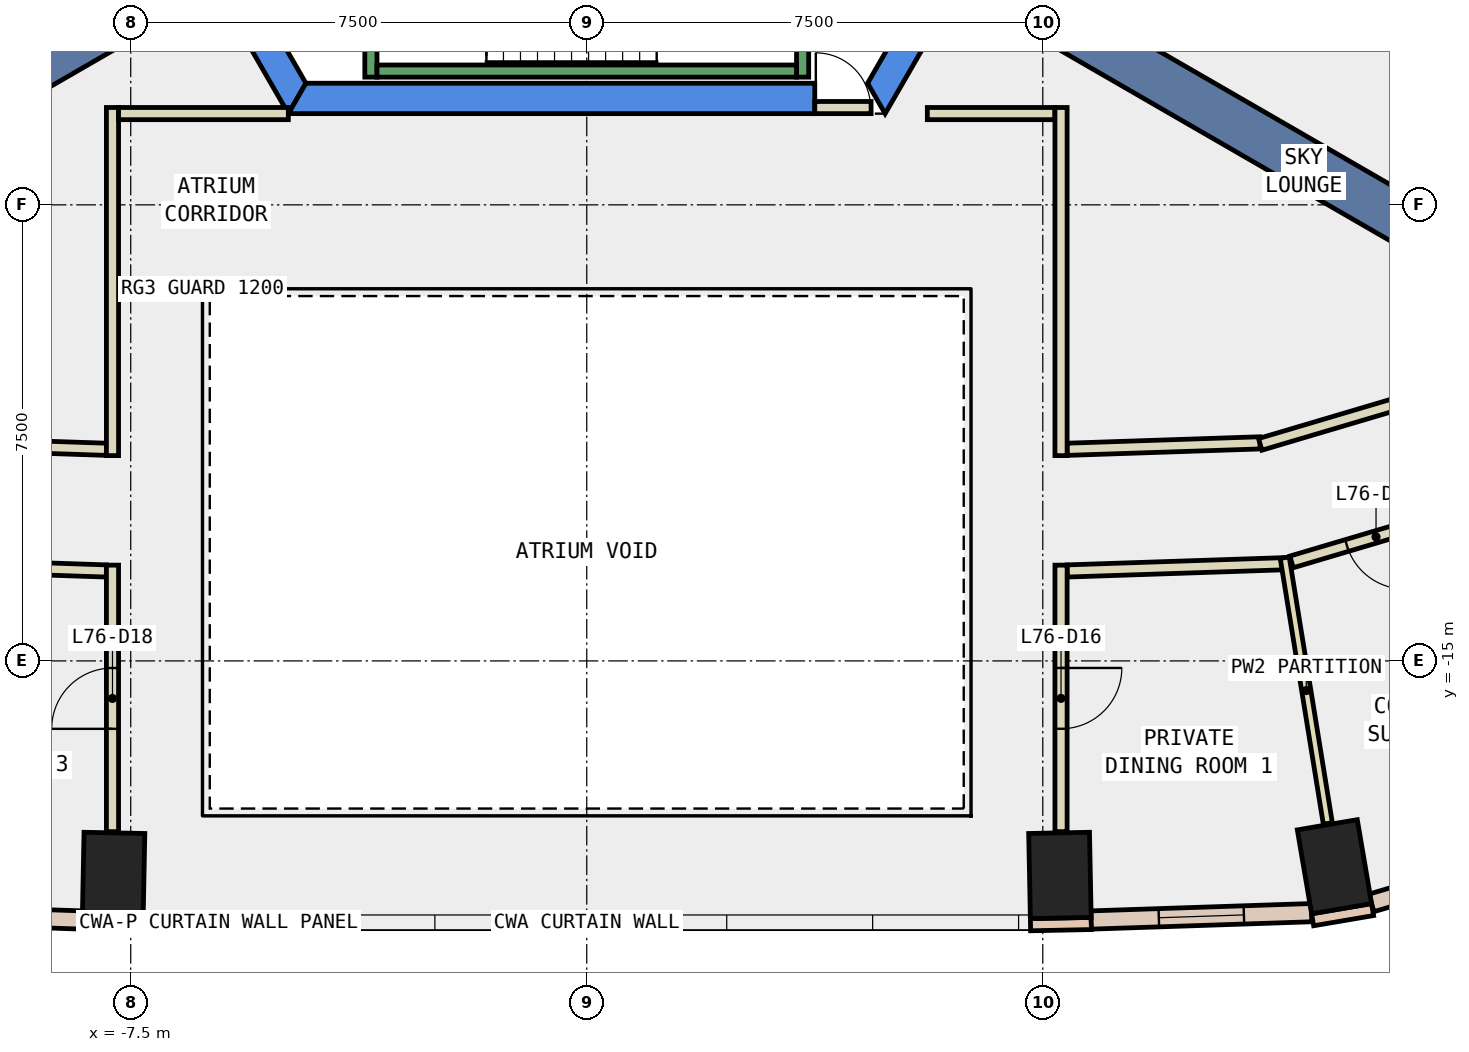
"""IFC4 building model, lengths in metres.
Left out: names, types, materials, properties, quantities, classifications, styles, units other than length and angle.
Written with IfcOpenShell. Run it as: python <this file> out.ifc"""

import sys

from ifc_helpers import new_model, si_unit, direction, frame, frame_2d, origin, origin_2d, place, context, subcontext, project, spatial, polyline, rectangle, outline, extrude, element, fill, save


model = new_model("IFC4")
c1 = context("Model", 3, precision=1e-05, world=origin(), true_north=direction((0.0, 1.0)))
c2 = subcontext(c1, "Body", "Model", "MODEL_VIEW")
j1 = project(units=[si_unit("LENGTHUNIT", "METRE"), si_unit("PLANEANGLEUNIT", "RADIAN")], contexts=[c1])
p1 = place(None, origin())
s1 = spatial("IfcSite", under=j1, at=p1, CompositionType="ELEMENT")
p2 = place(p1, origin())
s2 = spatial("IfcBuilding", under=s1, at=p2, CompositionType="ELEMENT")
p3 = place(p2, frame((0.0, 0.0, 322.4)))
s3 = spatial("IfcBuildingStorey", under=s2, at=p3, CompositionType="ELEMENT", Elevation=322.4)
for number, where, z_axis, x_axis in (
    (1, (-7.782, -18.528, -0.34), (0.0, 0.0, 1.0), (-1.0, 0.02, 0.0)),
    (2, (7.782, -18.528, -0.34), (0.0, 0.0, 1.0), (1.0, 0.02, 0.0)),
    (3, (12.297, -18.385, -0.34), (0.0, 0.0, 1.0), (0.986, 0.168, 0.0)),
):
    element("IfcColumn", number, at=place(p3, frame(where, z_axis=z_axis, x_axis=x_axis)), inside=s3, PredefinedType="COLUMN", context=c2, shape_type="SweptSolid", body=[
        extrude(rectangle(XDim=1.0, YDim=1.4, at=origin_2d()), origin(), (0.0, 0.0, 1.0), 3.34),
    ])
p4 = place(p3, frame((0.0, 0.0, -0.34)))
e4 = element("IfcWall", 4, at=p4, inside=s3, PredefinedType="SHEAR", context=c2, shape_type="SweptSolid", body=[
    extrude(outline(polyline([(-9.815, 2.5), (-4.907, -6.0), (-4.619, -5.5), (-9.238, 2.5), (-9.815, 2.5)])), origin(), (0.0, 0.0, 1.0), 3.34),
])
p5 = place(p3, frame((0.0, 0.0, -0.34)))
e5 = element("IfcWall", 5, at=p5, inside=s3, PredefinedType="SHEAR", context=c2, shape_type="SweptSolid", body=[
    extrude(outline(polyline([(3.75, -6.0), (3.75, -5.5), (-4.619, -5.5), (-4.907, -6.0), (3.75, -6.0)])), origin(), (0.0, 0.0, 1.0), 3.34),
])
p6 = place(p3, frame((0.0, 0.0, -0.34)))
e6 = element("IfcWall", 6, at=p6, inside=s3, PredefinedType="SHEAR", context=c2, shape_type="SweptSolid", body=[
    extrude(outline(polyline([(4.907, -6.0), (9.815, 2.5), (9.238, 2.5), (4.619, -5.5), (4.907, -6.0)])), origin(), (0.0, 0.0, 1.0), 3.34),
])
for number, where, z_axis, x_axis in (
    (7, (6.279, -3.625, -0.34), (0.0, 0.0, 1.0), (0.866, -0.5, 0.0)),
    (8, (-6.279, -3.625, -0.34), (0.0, 0.0, 1.0), (-0.866, -0.5, 0.0)),
):
    element("IfcWall", number, at=place(p3, frame(where, z_axis=z_axis, x_axis=x_axis)), inside=s3, PredefinedType="SHEAR", context=c2, shape_type="SweptSolid", body=[
        extrude(rectangle(XDim=9.0, YDim=0.8, at=frame_2d((4.5, 0.0))), origin(), (0.0, 0.0, 1.0), 3.34),
    ])
for number, where, z_axis, x_axis in (
    (9, (-8.298, -19.318, 0.0), (0.0, 0.0, 1.0), (1.0, -0.02, 0.0)),
    (10, (7.298, -19.338, 0.0), (0.0, 0.0, 1.0), (1.0, 0.02, 0.0)),
    (11, (11.938, -19.257, 0.0), (0.0, 0.0, 1.0), (0.986, 0.168, 0.0)),
):
    element("IfcWall", number, at=place(p3, frame(where, z_axis=z_axis, x_axis=x_axis)), inside=s3, PredefinedType="STANDARD", context=c2, shape_type="SweptSolid", body=[
        extrude(rectangle(XDim=1.0, YDim=0.2, at=frame_2d((0.5, 0.0))), origin(), (0.0, 0.0, 1.0), 3.0),
    ])
p7 = place(p3, frame((-11.919, -19.14, 0.0), z_axis=(0.0, 0.0, 1.0), x_axis=(0.999441913039, -0.033404527552, 0.0)))
e12 = element("IfcWall", 12, at=p7, inside=s3, PredefinedType="STANDARD", context=c2, shape_type="SweptSolid", body=[
    extrude(rectangle(XDim=3.625, YDim=0.3, at=frame_2d((1.812, 0.0))), origin(), (0.0, 0.0, 1.0), 3.0),
])
p8 = place(p7, frame((1.113, 0.0, 0.9)))
e13 = element("IfcOpeningElement", 13, at=p8, cuts=e12, PredefinedType="OPENING", context=c2, shape_type="SweptSolid", body=[
    extrude(rectangle(XDim=1.4, YDim=2.0, at=frame_2d((0.7, 1.0))), frame((0.0, 0.16, 0.0), z_axis=(0.0, -1.0, 0.0), x_axis=(1.0, 0.0, 0.0)), (0.0, 0.0, 1.0), 0.32),
])
p9 = place(p3, frame((8.296, -19.261, 0.0), z_axis=(0.0, 0.0, 1.0), x_axis=(0.999441913039, 0.033404527552, 0.0)))
e14 = element("IfcWall", 14, at=p9, inside=s3, PredefinedType="STANDARD", context=c2, shape_type="SweptSolid", body=[
    extrude(rectangle(XDim=3.625, YDim=0.3, at=frame_2d((1.812, 0.0))), origin(), (0.0, 0.0, 1.0), 3.0),
])
p10 = place(p9, frame((1.113, 0.0, 0.9)))
e15 = element("IfcOpeningElement", 15, at=p10, cuts=e14, PredefinedType="OPENING", context=c2, shape_type="SweptSolid", body=[
    extrude(rectangle(XDim=1.4, YDim=2.0, at=frame_2d((0.7, 1.0))), frame((0.0, 0.16, 0.0), z_axis=(0.0, -1.0, 0.0), x_axis=(1.0, 0.0, 0.0)), (0.0, 0.0, 1.0), 0.32),
])
p11 = place(p3, frame((12.904, -18.98, 0.0), z_axis=(0.0, 0.0, 1.0), x_axis=(0.958757933751, 0.284223898486, 0.0)))
e16 = element("IfcWall", 16, at=p11, inside=s3, PredefinedType="STANDARD", context=c2, shape_type="SweptSolid", body=[
    extrude(rectangle(XDim=5.15, YDim=0.3, at=frame_2d((2.575, 0.0))), origin(), (0.0, 0.0, 1.0), 3.0),
])
p12 = place(p11, frame((0.588, 0.0, 0.9)))
e17 = element("IfcOpeningElement", 17, at=p12, cuts=e16, PredefinedType="OPENING", context=c2, shape_type="SweptSolid", body=[
    extrude(rectangle(XDim=1.4, YDim=2.0, at=frame_2d((0.7, 1.0))), frame((0.0, 0.16, 0.0), z_axis=(0.0, -1.0, 0.0), x_axis=(1.0, 0.0, 0.0)), (0.0, 0.0, 1.0), 0.32),
])
p13 = place(p11, frame((3.163, 0.0, 0.9)))
e18 = element("IfcOpeningElement", 18, at=p13, cuts=e16, PredefinedType="OPENING", context=c2, shape_type="SweptSolid", body=[
    extrude(rectangle(XDim=1.4, YDim=2.0, at=frame_2d((0.7, 1.0))), frame((0.0, 0.16, 0.0), z_axis=(0.0, -1.0, 0.0), x_axis=(1.0, 0.0, 0.0)), (0.0, 0.0, 1.0), 0.32),
])
p14 = place(p3, frame((7.9, -11.52, 0.0), z_axis=(0.0, 0.0, 1.0), x_axis=(0.999442599499, 0.033383982774, 0.0)))
e19 = element("IfcWall", 19, at=p14, inside=s3, PredefinedType="PARTITIONING", context=c2, shape_type="SweptSolid", body=[
    extrude(rectangle(XDim=3.174, YDim=0.2, at=frame_2d((1.587, 0.0))), origin(), (0.0, 0.0, 1.0), 3.0),
])
p15 = place(p3, frame((11.076, -11.439, 0.0), z_axis=(0.0, 0.0, 1.0), x_axis=(0.958760241353, 0.284216114252, 0.0)))
e20 = element("IfcWall", 20, at=p15, inside=s3, PredefinedType="PARTITIONING", context=c2, shape_type="SweptSolid", body=[
    extrude(rectangle(XDim=3.578, YDim=0.2, at=frame_2d((1.789, 0.0))), origin(), (0.0, 0.0, 1.0), 3.0),
])
p16 = place(p3, frame((15.233, -4.982, 0.0), z_axis=(0.0, 0.0, 1.0), x_axis=(-0.475643534049, 0.879638123615, 0.0)))
e21 = element("IfcWall", 21, at=p16, inside=s3, PredefinedType="PARTITIONING", context=c2, shape_type="SweptSolid", body=[
    extrude(rectangle(XDim=7.871, YDim=0.2, at=frame_2d((3.936, 0.0))), origin(), (0.0, 0.0, 1.0), 3.0),
])
p17 = place(p16, frame((3.036, 0.0, 0.0)))
e22 = element("IfcOpeningElement", 22, at=p17, cuts=e21, PredefinedType="OPENING", context=c2, shape_type="SweptSolid", body=[
    extrude(rectangle(XDim=1.8, YDim=2.1, at=frame_2d((0.9, 1.05))), frame((0.0, 0.11, 0.0), z_axis=(0.0, -1.0, 0.0), x_axis=(1.0, 0.0, 0.0)), (0.0, 0.0, 1.0), 0.22),
])
p18 = place(p3, frame((-11.072, -11.414, 0.0), z_axis=(0.0, 0.0, 1.0), x_axis=(0.999442599499, -0.033383982774, 0.0)))
e23 = element("IfcWall", 23, at=p18, inside=s3, PredefinedType="PARTITIONING", context=c2, shape_type="SweptSolid", body=[
    extrude(rectangle(XDim=3.174, YDim=0.2, at=frame_2d((1.587, 0.0))), origin(), (0.0, 0.0, 1.0), 3.0),
])
p19 = place(p3, frame((11.52, -13.4, 0.0), z_axis=(0.0, 0.0, 1.0), x_axis=(-0.999441010134, -0.033431530957, 0.0)))
e24 = element("IfcWall", 24, at=p19, inside=s3, PredefinedType="PARTITIONING", context=c2, shape_type="SweptSolid", body=[
    extrude(rectangle(XDim=3.622, YDim=0.2, at=frame_2d((1.811, 0.0))), origin(), (0.0, 0.0, 1.0), 3.0),
])
p20 = place(p3, frame((14.371, -12.548, 0.0), z_axis=(0.0, 0.0, 1.0), x_axis=(-0.958773475867, -0.284171465799, 0.0)))
e25 = element("IfcWall", 25, at=p20, inside=s3, PredefinedType="PARTITIONING", context=c2, shape_type="SweptSolid", body=[
    extrude(rectangle(XDim=2.9, YDim=0.2, at=frame_2d((1.45, 0.0))), origin(), (0.0, 0.0, 1.0), 3.0),
])
p21 = place(p20, frame((0.95, 0.0, 0.0)))
e26 = element("IfcOpeningElement", 26, at=p21, cuts=e25, PredefinedType="OPENING", context=c2, shape_type="SweptSolid", body=[
    extrude(rectangle(XDim=1.0, YDim=2.1, at=frame_2d((0.5, 1.05))), frame((0.0, 0.11, 0.0), z_axis=(0.0, -1.0, 0.0), x_axis=(1.0, 0.0, 0.0)), (0.0, 0.0, 1.0), 0.22),
])
p22 = place(p3, frame((-7.9, -13.521, 0.0), z_axis=(0.0, 0.0, 1.0), x_axis=(-0.999437184802, 0.033545694739, 0.0)))
e27 = element("IfcWall", 27, at=p22, inside=s3, PredefinedType="PARTITIONING", context=c2, shape_type="SweptSolid", body=[
    extrude(rectangle(XDim=3.697, YDim=0.2, at=frame_2d((1.849, 0.0))), origin(), (0.0, 0.0, 1.0), 3.0),
])
p23 = place(p3, frame((5.601, -5.999, 0.0), z_axis=(0.0, 0.0, 1.0), x_axis=(1.0, 0.0, 0.0)))
e28 = element("IfcWall", 28, at=p23, inside=s3, PredefinedType="PARTITIONING", context=c2, shape_type="SweptSolid", body=[
    extrude(rectangle(XDim=2.099, YDim=0.2, at=frame_2d((1.049, 0.0))), origin(), (0.0, 0.0, 1.0), 3.0),
])
for number, where, z_axis, x_axis in (
    (29, (7.8, -5.899, 0.0), (0.0, 0.0, 1.0), (0.0, -1.0, 0.0)),
    (30, (-7.8, -11.624, 0.0), (0.0, 0.0, 1.0), (0.0, 1.0, 0.0)),
):
    element("IfcWall", number, at=place(p3, frame(where, z_axis=z_axis, x_axis=x_axis)), inside=s3, PredefinedType="PARTITIONING", context=c2, shape_type="SweptSolid", body=[
        extrude(rectangle(XDim=5.725, YDim=0.2, at=frame_2d((2.863, 0.0))), origin(), (0.0, 0.0, 1.0), 3.0),
    ])
p24 = place(p3, frame((-7.7, -5.999, 0.0), z_axis=(0.0, 0.0, 1.0), x_axis=(1.0, 0.0, 0.0)))
e31 = element("IfcWall", 31, at=p24, inside=s3, PredefinedType="PARTITIONING", context=c2, shape_type="SweptSolid", body=[
    extrude(rectangle(XDim=2.792, YDim=0.2, at=frame_2d((1.396, 0.0))), origin(), (0.0, 0.0, 1.0), 3.0),
])
p25 = place(p3, frame((7.8, -13.425, 0.0), z_axis=(0.0, 0.0, 1.0), x_axis=(0.0, -1.0, 0.0)))
e32 = element("IfcWall", 32, at=p25, inside=s3, PredefinedType="PARTITIONING", context=c2, shape_type="SweptSolid", body=[
    extrude(rectangle(XDim=4.383, YDim=0.2, at=frame_2d((2.191, 0.0))), origin(), (0.0, 0.0, 1.0), 3.0),
])
p26 = place(p25, frame((1.691, 0.0, 0.0)))
e33 = element("IfcOpeningElement", 33, at=p26, cuts=e32, PredefinedType="OPENING", context=c2, shape_type="SweptSolid", body=[
    extrude(rectangle(XDim=1.0, YDim=2.1, at=frame_2d((0.5, 1.05))), frame((0.0, 0.11, 0.0), z_axis=(0.0, -1.0, 0.0), x_axis=(1.0, 0.0, 0.0)), (0.0, 0.0, 1.0), 0.22),
])
p27 = place(p3, frame((-7.8, -17.808, 0.0), z_axis=(0.0, 0.0, 1.0), x_axis=(0.0, 1.0, 0.0)))
e34 = element("IfcWall", 34, at=p27, inside=s3, PredefinedType="PARTITIONING", context=c2, shape_type="SweptSolid", body=[
    extrude(rectangle(XDim=4.383, YDim=0.2, at=frame_2d((2.191, 0.0))), origin(), (0.0, 0.0, 1.0), 3.0),
])
p28 = place(p27, frame((1.691, 0.0, 0.0)))
e35 = element("IfcOpeningElement", 35, at=p28, cuts=e34, PredefinedType="OPENING", context=c2, shape_type="SweptSolid", body=[
    extrude(rectangle(XDim=1.0, YDim=2.1, at=frame_2d((0.5, 1.05))), frame((0.0, 0.11, 0.0), z_axis=(0.0, -1.0, 0.0), x_axis=(1.0, 0.0, 0.0)), (0.0, 0.0, 1.0), 0.22),
])
p29 = place(p3, frame((-6.705, -2.887, 0.0), z_axis=(0.0, 0.0, 1.0), x_axis=(-0.866001397039, -0.500041578597, 0.0)))
e36 = element("IfcWall", 36, at=p29, inside=s3, PredefinedType="PARTITIONING", context=c2, shape_type="SweptSolid", body=[
    extrude(rectangle(XDim=6.998, YDim=0.1, at=frame_2d((3.499, 0.0))), origin(), (0.0, 0.0, 1.0), 3.0),
])
p30 = place(p3, frame((11.479, -13.302, 0.0), z_axis=(0.0, 0.0, 1.0), x_axis=(0.16010600403, -0.987099826499, 0.0)))
e37 = element("IfcWall", 37, at=p30, inside=s3, PredefinedType="PARTITIONING", context=c2, shape_type="SweptSolid", body=[
    extrude(rectangle(XDim=4.428, YDim=0.15, at=frame_2d((2.214, 0.0))), origin(), (0.0, 0.0, 1.0), 3.0),
])
p31 = place(p3, frame((3.75, -5.9, 0.0), z_axis=(0.0, 0.0, 1.0), x_axis=(1.0, 0.0, 0.0)))
e38 = element("IfcWall", 38, at=p31, inside=s3, PredefinedType="PARTITIONING", context=c2, shape_type="SweptSolid", body=[
    extrude(rectangle(XDim=0.926, YDim=0.2, at=frame_2d((0.463, 0.0))), origin(), (0.0, 0.0, 1.0), 2.4),
])
p32 = place(p31, frame((0.017, 0.0, 0.0)))
e39 = element("IfcOpeningElement", 39, at=p32, cuts=e38, PredefinedType="OPENING", context=c2, shape_type="SweptSolid", body=[
    extrude(rectangle(XDim=0.9, YDim=2.1, at=frame_2d((0.45, 1.05))), frame((0.0, 0.11, 0.0), z_axis=(0.0, -1.0, 0.0), x_axis=(1.0, 0.0, 0.0)), (0.0, 0.0, 1.0), 0.22),
])
p33 = place(p3, frame((-3.55, -1.0, 0.0), z_axis=(0.0, 0.0, 1.0), x_axis=(0.0, -1.0, 0.0)))
e40 = element("IfcWall", 40, at=p33, inside=s3, PredefinedType="STANDARD", context=c2, shape_type="SweptSolid", body=[
    extrude(rectangle(XDim=4.4, YDim=0.2, at=frame_2d((2.2, 0.0))), origin(), (0.0, 0.0, 1.0), 3.0),
])
p34 = place(p33, frame((2.4, 0.0, 0.0)))
e41 = element("IfcOpeningElement", 41, at=p34, cuts=e40, PredefinedType="OPENING", context=c2, shape_type="SweptSolid", body=[
    extrude(rectangle(XDim=1.1, YDim=2.2, at=frame_2d((0.55, 1.1))), frame((0.0, 0.11, 0.0), z_axis=(0.0, -1.0, 0.0), x_axis=(1.0, 0.0, 0.0)), (0.0, 0.0, 1.0), 0.22),
])
p35 = place(p3, frame((3.55, -2.667, 0.0), z_axis=(0.0, 0.0, 1.0), x_axis=(0.0, -1.0, 0.0)))
e42 = element("IfcWall", 42, at=p35, inside=s3, PredefinedType="STANDARD", context=c2, shape_type="SweptSolid", body=[
    extrude(rectangle(XDim=2.733, YDim=0.2, at=frame_2d((1.366, 0.0))), origin(), (0.0, 0.0, 1.0), 3.0),
])
p36 = place(p3, frame((-3.45, -5.3, 0.0), z_axis=(0.0, 0.0, 1.0), x_axis=(1.0, 0.0, 0.0)))
e43 = element("IfcWall", 43, at=p36, inside=s3, PredefinedType="STANDARD", context=c2, shape_type="SweptSolid", body=[
    extrude(rectangle(XDim=6.9, YDim=0.2, at=frame_2d((3.45, 0.0))), origin(), (0.0, 0.0, 1.0), 3.0),
])
p37 = place(p10, origin())
e44 = element("IfcWindow", 44, at=p37, inside=s3, PartitioningType="SINGLE_PANEL", PredefinedType="WINDOW", context=c2, shape_type="SweptSolid", body=[
    extrude(rectangle(XDim=1.4, YDim=2.0, at=frame_2d((0.7, 1.0))), frame((0.0, 0.03, 0.0), z_axis=(0.0, -1.0, 0.0), x_axis=(1.0, 0.0, 0.0)), (0.0, 0.0, 1.0), 0.06),
])
fill(e15, e44)
p38 = place(p21, origin())
e45 = element("IfcDoor", 45, at=p38, inside=s3, OperationType="SINGLE_SWING_LEFT", PredefinedType="DOOR", context=c2, shape_type="SweptSolid", body=[
    extrude(rectangle(XDim=1.0, YDim=2.1, at=frame_2d((0.5, 1.05))), frame((0.0, 0.025, 0.0), z_axis=(0.0, -1.0, 0.0), x_axis=(1.0, 0.0, 0.0)), (0.0, 0.0, 1.0), 0.05),
])
fill(e26, e45)
p39 = place(p26, origin())
e46 = element("IfcDoor", 46, at=p39, inside=s3, OperationType="SINGLE_SWING_LEFT", PredefinedType="DOOR", context=c2, shape_type="SweptSolid", body=[
    extrude(rectangle(XDim=1.0, YDim=2.1, at=frame_2d((0.5, 1.05))), frame((0.0, 0.025, 0.0), z_axis=(0.0, -1.0, 0.0), x_axis=(1.0, 0.0, 0.0)), (0.0, 0.0, 1.0), 0.05),
])
fill(e33, e46)
p40 = place(p28, origin())
e47 = element("IfcDoor", 47, at=p40, inside=s3, OperationType="SINGLE_SWING_LEFT", PredefinedType="DOOR", context=c2, shape_type="SweptSolid", body=[
    extrude(rectangle(XDim=1.0, YDim=2.1, at=frame_2d((0.5, 1.05))), frame((0.0, 0.025, 0.0), z_axis=(0.0, -1.0, 0.0), x_axis=(1.0, 0.0, 0.0)), (0.0, 0.0, 1.0), 0.05),
])
fill(e35, e47)
p41 = place(p32, origin())
e48 = element("IfcDoor", 48, at=p41, inside=s3, OperationType="SINGLE_SWING_LEFT", PredefinedType="DOOR", context=c2, shape_type="SweptSolid", body=[
    extrude(rectangle(XDim=0.9, YDim=2.1, at=frame_2d((0.45, 1.05))), frame((0.0, 0.025, 0.0), z_axis=(0.0, -1.0, 0.0), x_axis=(1.0, 0.0, 0.0)), (0.0, 0.0, 1.0), 0.05),
])
fill(e39, e48)
save(model, sys.argv[1])
